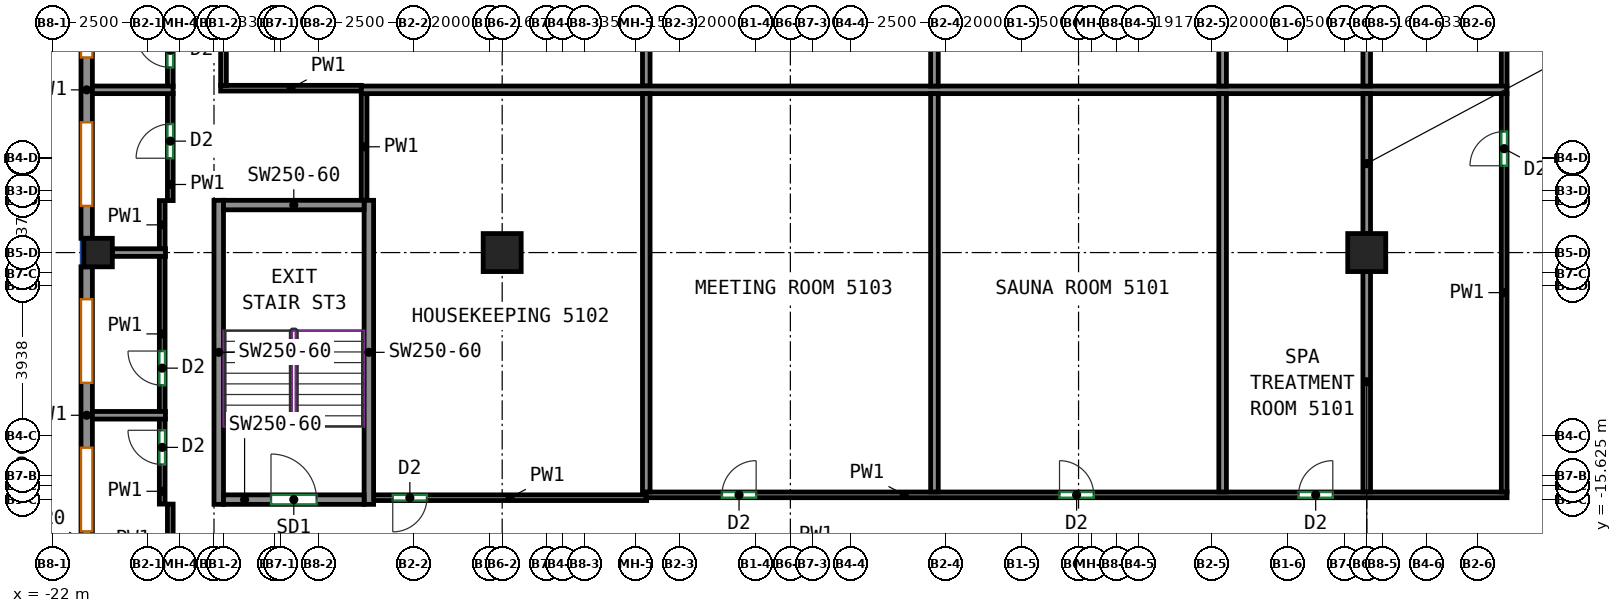
"""IFC4 building model, lengths in metres.
Left out: names, types, materials, properties, quantities, classifications, styles, units other than length and angle.
Written with IfcOpenShell. Run it as: python <this file> out.ifc"""

import sys

from ifc_helpers import new_model, si_unit, direction, frame, frame_2d, origin, origin_2d, place, context, subcontext, project, spatial, rectangle, extrude, source, transform, mapped, element, fill, save


model = new_model("IFC4")
c1 = context("Model", 3, precision=1e-05, world=origin(), true_north=direction((0.0, 1.0)))
c2 = subcontext(c1, "Body", "Model", "MODEL_VIEW")
j1 = project(units=[si_unit("LENGTHUNIT", "METRE"), si_unit("PLANEANGLEUNIT", "RADIAN")], contexts=[c1])
p1 = place(None, origin())
s1 = spatial("IfcSite", under=j1, at=p1, CompositionType="ELEMENT")
p2 = place(p1, origin())
s2 = spatial("IfcBuilding", under=s1, at=p2, CompositionType="ELEMENT")
p3 = place(p2, frame((0.0, 0.0, 210.1)))
s3 = spatial("IfcBuildingStorey", under=s2, at=p3, CompositionType="ELEMENT", Elevation=210.1)
m1 = source(origin(), c2, "Body", "SweptSolid", [
    extrude(rectangle(XDim=0.75, YDim=0.75, at=origin_2d()), origin(), (0.0, 0.0, 1.0), 3.12),
])
p4 = place(p3, frame((-20.8, -9.125, 0.0), z_axis=(0.0, 0.0, 1.0), x_axis=(1.0, 0.0, 0.0)))
e1 = element("IfcColumn", 1, at=p4, inside=s3, PredefinedType="COLUMN", context=c2, shape_type="MappedRepresentation", body=[
    mapped(m1, transform((0.0, 0.0, 0.0))),
])
m2 = source(origin(), c2, "Body", "SweptSolid", [
    extrude(rectangle(XDim=1.0, YDim=1.0, at=origin_2d()), origin(), (0.0, 0.0, 1.0), 3.12),
])
for number, where, z_axis, x_axis in (
    (2, (-10.167, -9.125, 0.0), (0.0, 0.0, 1.0), (1.0, 0.0, 0.0)),
    (3, (12.583, -9.125, 0.0), (0.0, 0.0, 1.0), (1.0, 0.0, 0.0)),
):
    element("IfcColumn", number, at=place(p3, frame(where, z_axis=z_axis, x_axis=x_axis)), inside=s3, PredefinedType="COLUMN", context=c2, shape_type="MappedRepresentation", body=[
        mapped(m2, transform((0.0, 0.0, 0.0))),
    ])
m3 = source(origin(), c2, "Body", "SweptSolid", [
    extrude(rectangle(XDim=8.0, YDim=0.25, at=frame_2d((4.0, 0.0))), origin(), (0.0, 0.0, 1.0), 3.12),
])
for number, where, z_axis, x_axis in (
    (4, (-17.625, -15.75, 0.0), (0.0, 0.0, 1.0), (0.0, 1.0, 0.0)),
    (5, (-13.675, -15.75, 0.0), (0.0, 0.0, 1.0), (0.0, 1.0, 0.0)),
):
    element("IfcWall", number, at=place(p3, frame(where, z_axis=z_axis, x_axis=x_axis)), inside=s3, PredefinedType="SHEAR", context=c2, shape_type="MappedRepresentation", body=[
        mapped(m3, transform((0.0, 0.0, 0.0))),
    ])
m4 = source(origin(), c2, "Body", "SweptSolid", [
    extrude(rectangle(XDim=3.7, YDim=0.25, at=frame_2d((1.85, 0.0))), origin(), (0.0, 0.0, 1.0), 3.12),
])
p5 = place(p3, frame((-17.5, -15.625, 0.0), z_axis=(0.0, 0.0, 1.0), x_axis=(1.0, 0.0, 0.0)))
e6 = element("IfcWall", 6, at=p5, inside=s3, PredefinedType="SHEAR", context=c2, shape_type="MappedRepresentation", body=[
    mapped(m4, transform((0.0, 0.0, 0.0))),
])
p6 = place(p5, frame((1.25, 0.0, 0.0)))
e7 = element("IfcOpeningElement", 7, at=p6, cuts=e6, PredefinedType="OPENING", context=c2, shape_type="SweptSolid", body=[
    extrude(rectangle(XDim=1.2, YDim=2.1, at=frame_2d((0.6, 1.05))), frame((0.0, 0.135, 0.0), z_axis=(0.0, -1.0, 0.0), x_axis=(1.0, 0.0, 0.0)), (0.0, 0.0, 1.0), 0.27),
])
p7 = place(p3, frame((-17.5, -7.875, 0.0), z_axis=(0.0, 0.0, 1.0), x_axis=(1.0, 0.0, 0.0)))
e8 = element("IfcWall", 8, at=p7, inside=s3, PredefinedType="SHEAR", context=c2, shape_type="MappedRepresentation", body=[
    mapped(m4, transform((0.0, 0.0, 0.0))),
])
m5 = source(origin(), c2, "Body", "SweptSolid", [
    extrude(rectangle(XDim=7.812, YDim=0.3, at=frame_2d((3.906, 0.0))), origin(), (0.0, 0.0, 1.0), 3.12),
])
p8 = place(p3, frame((-21.1, -0.938, 0.0), z_axis=(0.0, 0.0, 1.0), x_axis=(0.0, -1.0, 0.0)))
e9 = element("IfcWall", 9, at=p8, inside=s3, PredefinedType="SOLIDWALL", context=c2, shape_type="MappedRepresentation", body=[
    mapped(m5, transform((0.0, 0.0, 0.0))),
])
p9 = place(p8, frame((0.853, 0.0, 0.85)))
e10 = element("IfcOpeningElement", 10, at=p9, cuts=e9, PredefinedType="OPENING", context=c2, shape_type="SweptSolid", body=[
    extrude(rectangle(XDim=2.2, YDim=1.95, at=frame_2d((1.1, 0.975))), frame((0.0, 0.16, 0.0), z_axis=(0.0, -1.0, 0.0), x_axis=(1.0, 0.0, 0.0)), (0.0, 0.0, 1.0), 0.32),
])
p10 = place(p8, frame((4.76, 0.0, 0.85)))
e11 = element("IfcOpeningElement", 11, at=p10, cuts=e9, PredefinedType="OPENING", context=c2, shape_type="SweptSolid", body=[
    extrude(rectangle(XDim=2.2, YDim=1.95, at=frame_2d((1.1, 0.975))), frame((0.0, 0.16, 0.0), z_axis=(0.0, -1.0, 0.0), x_axis=(1.0, 0.0, 0.0)), (0.0, 0.0, 1.0), 0.32),
])
p11 = place(p3, frame((-21.1, -9.5, 0.0), z_axis=(0.0, 0.0, 1.0), x_axis=(0.0, -1.0, 0.0)))
e12 = element("IfcWall", 12, at=p11, inside=s3, PredefinedType="SOLIDWALL", context=c2, shape_type="MappedRepresentation", body=[
    mapped(m5, transform((0.0, 0.0, 0.0))),
])
p12 = place(p11, frame((0.853, 0.0, 0.85)))
e13 = element("IfcOpeningElement", 13, at=p12, cuts=e12, PredefinedType="OPENING", context=c2, shape_type="SweptSolid", body=[
    extrude(rectangle(XDim=2.2, YDim=1.95, at=frame_2d((1.1, 0.975))), frame((0.0, 0.16, 0.0), z_axis=(0.0, -1.0, 0.0), x_axis=(1.0, 0.0, 0.0)), (0.0, 0.0, 1.0), 0.32),
])
p13 = place(p11, frame((4.759, 0.0, 0.85)))
e14 = element("IfcOpeningElement", 14, at=p13, cuts=e12, PredefinedType="OPENING", context=c2, shape_type="SweptSolid", body=[
    extrude(rectangle(XDim=2.2, YDim=1.95, at=frame_2d((1.1, 0.975))), frame((0.0, 0.16, 0.0), z_axis=(0.0, -1.0, 0.0), x_axis=(1.0, 0.0, 0.0)), (0.0, 0.0, 1.0), 0.32),
])
p14 = place(p3, frame((-18.9, -17.598, 0.0), z_axis=(0.0, 0.0, 1.0), x_axis=(0.0, 1.0, 0.0)))
e15 = element("IfcWall", 15, at=p14, inside=s3, PredefinedType="PARTITIONING", context=c2, shape_type="SweptSolid", body=[
    extrude(rectangle(XDim=1.855, YDim=0.15, at=frame_2d((0.927, 0.0))), origin(), (0.0, 0.0, 1.0), 3.12),
])
p15 = place(p3, frame((-19.113, -15.743, 0.0), z_axis=(0.0, 0.0, 1.0), x_axis=(0.0, 1.0, 0.0)))
e16 = element("IfcWall", 16, at=p15, inside=s3, PredefinedType="PARTITIONING", context=c2, shape_type="SweptSolid", body=[
    extrude(rectangle(XDim=2.247, YDim=0.15, at=frame_2d((1.124, 0.0))), origin(), (0.0, 0.0, 1.0), 3.12),
])
p16 = place(p15, frame((1.042, 0.0, 0.0)))
e17 = element("IfcOpeningElement", 17, at=p16, cuts=e16, PredefinedType="OPENING", context=c2, shape_type="SweptSolid", body=[
    extrude(rectangle(XDim=0.9, YDim=2.1, at=frame_2d((0.45, 1.05))), frame((0.0, 0.085, 0.0), z_axis=(0.0, -1.0, 0.0), x_axis=(1.0, 0.0, 0.0)), (0.0, 0.0, 1.0), 0.17),
])
p17 = place(p3, frame((-19.113, -13.316, 0.0), z_axis=(0.0, 0.0, 1.0), x_axis=(0.0, 1.0, 0.0)))
e18 = element("IfcWall", 18, at=p17, inside=s3, PredefinedType="PARTITIONING", context=c2, shape_type="SweptSolid", body=[
    extrude(rectangle(XDim=4.101, YDim=0.15, at=frame_2d((2.05, 0.0))), origin(), (0.0, 0.0, 1.0), 3.12),
])
p18 = place(p17, frame((0.7, 0.0, 0.0)))
e19 = element("IfcOpeningElement", 19, at=p18, cuts=e18, PredefinedType="OPENING", context=c2, shape_type="SweptSolid", body=[
    extrude(rectangle(XDim=0.9, YDim=2.1, at=frame_2d((0.45, 1.05))), frame((0.0, 0.085, 0.0), z_axis=(0.0, -1.0, 0.0), x_axis=(1.0, 0.0, 0.0)), (0.0, 0.0, 1.0), 0.17),
])
p19 = place(p3, frame((-18.9, -7.757, 0.0), z_axis=(0.0, 0.0, 1.0), x_axis=(0.0, 1.0, 0.0)))
e20 = element("IfcWall", 20, at=p19, inside=s3, PredefinedType="PARTITIONING", context=c2, shape_type="SweptSolid", body=[
    extrude(rectangle(XDim=2.824, YDim=0.15, at=frame_2d((1.412, 0.0))), origin(), (0.0, 0.0, 1.0), 3.12),
])
p20 = place(p19, frame((1.114, 0.0, 0.0)))
e21 = element("IfcOpeningElement", 21, at=p20, cuts=e20, PredefinedType="OPENING", context=c2, shape_type="SweptSolid", body=[
    extrude(rectangle(XDim=0.9, YDim=2.1, at=frame_2d((0.45, 1.05))), frame((0.0, 0.085, 0.0), z_axis=(0.0, -1.0, 0.0), x_axis=(1.0, 0.0, 0.0)), (0.0, 0.0, 1.0), 0.17),
])
p21 = place(p3, frame((-19.113, -9.035, 0.0), z_axis=(0.0, 0.0, 1.0), x_axis=(0.0, 1.0, 0.0)))
e22 = element("IfcWall", 22, at=p21, inside=s3, PredefinedType="PARTITIONING", context=c2, shape_type="SweptSolid", body=[
    extrude(rectangle(XDim=1.278, YDim=0.15, at=frame_2d((0.639, 0.0))), origin(), (0.0, 0.0, 1.0), 3.12),
])
p22 = place(p3, frame((-18.9, -4.753, 0.0), z_axis=(0.0, 0.0, 1.0), x_axis=(0.0, 1.0, 0.0)))
e23 = element("IfcWall", 23, at=p22, inside=s3, PredefinedType="PARTITIONING", context=c2, shape_type="SweptSolid", body=[
    extrude(rectangle(XDim=4.101, YDim=0.15, at=frame_2d((2.05, 0.0))), origin(), (0.0, 0.0, 1.0), 3.12),
])
p23 = place(p22, frame((0.5, 0.0, 0.0)))
e24 = element("IfcOpeningElement", 24, at=p23, cuts=e23, PredefinedType="OPENING", context=c2, shape_type="SweptSolid", body=[
    extrude(rectangle(XDim=0.9, YDim=2.1, at=frame_2d((0.45, 1.05))), frame((0.0, 0.085, 0.0), z_axis=(0.0, -1.0, 0.0), x_axis=(1.0, 0.0, 0.0)), (0.0, 0.0, 1.0), 0.17),
])
p24 = place(p3, frame((-17.575, -4.8, 0.0), z_axis=(0.0, 0.0, 1.0), x_axis=(1.0, 0.0, 0.0)))
e25 = element("IfcWall", 25, at=p24, inside=s3, PredefinedType="PARTITIONING", context=c2, shape_type="SweptSolid", body=[
    extrude(rectangle(XDim=3.702, YDim=0.15, at=frame_2d((1.851, 0.0))), origin(), (0.0, 0.0, 1.0), 3.12),
])
p25 = place(p3, frame((-17.5, -4.725, 0.0), z_axis=(0.0, 0.0, 1.0), x_axis=(0.0, 1.0, 0.0)))
e26 = element("IfcWall", 26, at=p25, inside=s3, PredefinedType="PARTITIONING", context=c2, shape_type="SweptSolid", body=[
    extrude(rectangle(XDim=8.35, YDim=0.15, at=frame_2d((4.175, 0.0))), origin(), (0.0, 0.0, 1.0), 3.12),
])
p26 = place(p3, frame((16.2, -4.753, 0.0), z_axis=(0.0, 0.0, 1.0), x_axis=(0.0, 1.0, 0.0)))
e27 = element("IfcWall", 27, at=p26, inside=s3, PredefinedType="PARTITIONING", context=c2, shape_type="SweptSolid", body=[
    extrude(rectangle(XDim=8.378, YDim=0.15, at=frame_2d((4.189, 0.0))), origin(), (0.0, 0.0, 1.0), 3.12),
])
p27 = place(p26, frame((1.514, 0.0, 0.0)))
e28 = element("IfcOpeningElement", 28, at=p27, cuts=e27, PredefinedType="OPENING", context=c2, shape_type="SweptSolid", body=[
    extrude(rectangle(XDim=0.9, YDim=2.1, at=frame_2d((0.45, 1.05))), frame((0.0, 0.085, 0.0), z_axis=(0.0, -1.0, 0.0), x_axis=(1.0, 0.0, 0.0)), (0.0, 0.0, 1.0), 0.17),
])
p28 = place(p3, frame((-13.8, -7.75, 0.0), z_axis=(0.0, 0.0, 1.0), x_axis=(0.0, 1.0, 0.0)))
e29 = element("IfcWall", 29, at=p28, inside=s3, PredefinedType="PARTITIONING", context=c2, shape_type="SweptSolid", body=[
    extrude(rectangle(XDim=2.817, YDim=0.15, at=frame_2d((1.408, 0.0))), origin(), (0.0, 0.0, 1.0), 3.12),
])
p29 = place(p3, frame((-6.365, -15.575, 0.0), z_axis=(0.0, 0.0, 1.0), x_axis=(-1.0, 0.0, 0.0)))
e30 = element("IfcWall", 30, at=p29, inside=s3, PredefinedType="PARTITIONING", context=c2, shape_type="SweptSolid", body=[
    extrude(rectangle(XDim=7.185, YDim=0.15, at=frame_2d((3.593, 0.0))), origin(), (0.0, 0.0, 1.0), 3.12),
])
p30 = place(p29, frame((5.781, 0.0, 0.0)))
e31 = element("IfcOpeningElement", 31, at=p30, cuts=e30, PredefinedType="OPENING", context=c2, shape_type="SweptSolid", body=[
    extrude(rectangle(XDim=0.9, YDim=2.1, at=frame_2d((0.45, 1.05))), frame((0.0, 0.085, 0.0), z_axis=(0.0, -1.0, 0.0), x_axis=(1.0, 0.0, 0.0)), (0.0, 0.0, 1.0), 0.17),
])
p31 = place(p3, frame((-6.385, -15.5, 0.0), z_axis=(0.0, 0.0, 1.0), x_axis=(1.0, 0.0, 0.0)))
e32 = element("IfcWall", 32, at=p31, inside=s3, PredefinedType="PARTITIONING", context=c2, shape_type="SweptSolid", body=[
    extrude(rectangle(XDim=22.66, YDim=0.15, at=frame_2d((11.33, 0.0))), origin(), (0.0, 0.0, 1.0), 3.12),
])
p32 = place(p31, frame((2.001, 0.0, 0.0)))
e33 = element("IfcOpeningElement", 33, at=p32, cuts=e32, PredefinedType="OPENING", context=c2, shape_type="SweptSolid", body=[
    extrude(rectangle(XDim=0.9, YDim=2.1, at=frame_2d((0.45, 1.05))), frame((0.0, 0.085, 0.0), z_axis=(0.0, -1.0, 0.0), x_axis=(1.0, 0.0, 0.0)), (0.0, 0.0, 1.0), 0.17),
])
p33 = place(p31, frame((10.884, 0.0, 0.0)))
e34 = element("IfcOpeningElement", 34, at=p33, cuts=e32, PredefinedType="OPENING", context=c2, shape_type="SweptSolid", body=[
    extrude(rectangle(XDim=0.9, YDim=2.1, at=frame_2d((0.45, 1.05))), frame((0.0, 0.085, 0.0), z_axis=(0.0, -1.0, 0.0), x_axis=(1.0, 0.0, 0.0)), (0.0, 0.0, 1.0), 0.17),
])
p34 = place(p31, frame((17.175, 0.0, 0.0)))
e35 = element("IfcOpeningElement", 35, at=p34, cuts=e32, PredefinedType="OPENING", context=c2, shape_type="SweptSolid", body=[
    extrude(rectangle(XDim=0.9, YDim=2.1, at=frame_2d((0.45, 1.05))), frame((0.0, 0.085, 0.0), z_axis=(0.0, -1.0, 0.0), x_axis=(1.0, 0.0, 0.0)), (0.0, 0.0, 1.0), 0.17),
])
p35 = place(p3, frame((16.2, -15.425, 0.0), z_axis=(0.0, 0.0, 1.0), x_axis=(0.0, 1.0, 0.0)))
e36 = element("IfcWall", 36, at=p35, inside=s3, PredefinedType="PARTITIONING", context=c2, shape_type="SweptSolid", body=[
    extrude(rectangle(XDim=10.492, YDim=0.15, at=frame_2d((5.246, 0.0))), origin(), (0.0, 0.0, 1.0), 3.12),
])
p36 = place(p35, frame((8.584, 0.0, 0.0)))
e37 = element("IfcOpeningElement", 37, at=p36, cuts=e36, PredefinedType="OPENING", context=c2, shape_type="SweptSolid", body=[
    extrude(rectangle(XDim=0.9, YDim=2.1, at=frame_2d((0.45, 1.05))), frame((0.0, 0.085, 0.0), z_axis=(0.0, -1.0, 0.0), x_axis=(1.0, 0.0, 0.0)), (0.0, 0.0, 1.0), 0.17),
])
p37 = place(p3, frame((-19.027, -13.406, 0.0), z_axis=(0.0, 0.0, 1.0), x_axis=(-1.0, 0.0, 0.0)))
e38 = element("IfcWall", 38, at=p37, inside=s3, PredefinedType="PARTITIONING", context=c2, shape_type="SweptSolid", body=[
    extrude(rectangle(XDim=1.973, YDim=0.2, at=frame_2d((0.986, 0.0))), origin(), (0.0, 0.0, 1.0), 3.12),
])
p38 = place(p3, frame((-20.425, -9.125, 0.0), z_axis=(0.0, 0.0, 1.0), x_axis=(1.0, 0.0, 0.0)))
e39 = element("IfcWall", 39, at=p38, inside=s3, PredefinedType="PARTITIONING", context=c2, shape_type="SweptSolid", body=[
    extrude(rectangle(XDim=1.398, YDim=0.2, at=frame_2d((0.699, 0.0))), origin(), (0.0, 0.0, 1.0), 3.12),
])
p39 = place(p3, frame((-21.0, -4.843, 0.0), z_axis=(0.0, 0.0, 1.0), x_axis=(1.0, 0.0, 0.0)))
e40 = element("IfcWall", 40, at=p39, inside=s3, PredefinedType="PARTITIONING", context=c2, shape_type="SweptSolid", body=[
    extrude(rectangle(XDim=2.173, YDim=0.2, at=frame_2d((1.086, 0.0))), origin(), (0.0, 0.0, 1.0), 3.12),
])
p40 = place(p3, frame((-6.375, -4.743, 0.0), z_axis=(0.0, 0.0, 1.0), x_axis=(0.0, 1.0, 0.0)))
e41 = element("IfcWall", 41, at=p40, inside=s3, PredefinedType="PARTITIONING", context=c2, shape_type="SweptSolid", body=[
    extrude(rectangle(XDim=8.366, YDim=0.2, at=frame_2d((4.183, 0.0))), origin(), (0.0, 0.0, 1.0), 3.12),
])
p41 = place(p3, frame((-13.873, -4.843, 0.0), z_axis=(0.0, 0.0, 1.0), x_axis=(1.0, 0.0, 0.0)))
e42 = element("IfcWall", 42, at=p41, inside=s3, PredefinedType="PARTITIONING", context=c2, shape_type="SweptSolid", body=[
    extrude(rectangle(XDim=30.146, YDim=0.2, at=frame_2d((15.073, 0.0))), origin(), (0.0, 0.0, 1.0), 3.12),
])
for number, where, z_axis, x_axis in (
    (43, (1.208, -4.743, 0.0), (0.0, 0.0, 1.0), (0.0, 1.0, 0.0)),
    (44, (8.791, -4.743, 0.0), (0.0, 0.0, 1.0), (0.0, 1.0, 0.0)),
):
    element("IfcWall", number, at=place(p3, frame(where, z_axis=z_axis, x_axis=x_axis)), inside=s3, PredefinedType="PARTITIONING", context=c2, shape_type="SweptSolid", body=[
        extrude(rectangle(XDim=8.366, YDim=0.2, at=frame_2d((4.183, 0.0))), origin(), (0.0, 0.0, 1.0), 3.12),
    ])
p42 = place(p3, frame((12.583, -4.743, 0.0), z_axis=(0.0, 0.0, 1.0), x_axis=(0.0, 1.0, 0.0)))
e45 = element("IfcWall", 45, at=p42, inside=s3, PredefinedType="PARTITIONING", context=c2, shape_type="SweptSolid", body=[
    extrude(rectangle(XDim=3.681, YDim=0.2, at=frame_2d((1.84, 0.0))), origin(), (0.0, 0.0, 1.0), 2.52),
])
for number, where, z_axis, x_axis in (
    (46, (-6.375, -15.423, 0.0), (0.0, 0.0, 1.0), (0.0, 1.0, 0.0)),
    (47, (1.208, -15.423, 0.0), (0.0, 0.0, 1.0), (0.0, 1.0, 0.0)),
    (48, (8.791, -15.423, 0.0), (0.0, 0.0, 1.0), (0.0, 1.0, 0.0)),
):
    element("IfcWall", number, at=place(p3, frame(where, z_axis=z_axis, x_axis=x_axis)), inside=s3, PredefinedType="PARTITIONING", context=c2, shape_type="SweptSolid", body=[
        extrude(rectangle(XDim=10.48, YDim=0.2, at=frame_2d((5.24, 0.0))), origin(), (0.0, 0.0, 1.0), 3.12),
    ])
p43 = place(p3, frame((12.583, -8.625, 0.0), z_axis=(0.0, 0.0, 1.0), x_axis=(0.0, 1.0, 0.0)))
e49 = element("IfcWall", 49, at=p43, inside=s3, PredefinedType="PARTITIONING", context=c2, shape_type="SweptSolid", body=[
    extrude(rectangle(XDim=3.682, YDim=0.2, at=frame_2d((1.841, 0.0))), origin(), (0.0, 0.0, 1.0), 2.52),
])
p44 = place(p3, frame((12.583, -15.423, 0.0), z_axis=(0.0, 0.0, 1.0), x_axis=(0.0, 1.0, 0.0)))
e50 = element("IfcWall", 50, at=p44, inside=s3, PredefinedType="PARTITIONING", context=c2, shape_type="SweptSolid", body=[
    extrude(rectangle(XDim=5.798, YDim=0.2, at=frame_2d((2.899, 0.0))), origin(), (0.0, 0.0, 1.0), 2.52),
])
p45 = place(p9, origin())
e51 = element("IfcWindow", 51, at=p45, inside=s3, PartitioningType="SINGLE_PANEL", PredefinedType="WINDOW", context=c2, shape_type="SweptSolid", body=[
    extrude(rectangle(XDim=2.2, YDim=1.95, at=frame_2d((1.1, 0.975))), frame((0.0, 0.03, 0.0), z_axis=(0.0, -1.0, 0.0), x_axis=(1.0, 0.0, 0.0)), (0.0, 0.0, 1.0), 0.06),
])
fill(e10, e51)
p46 = place(p10, origin())
e52 = element("IfcWindow", 52, at=p46, inside=s3, PartitioningType="SINGLE_PANEL", PredefinedType="WINDOW", context=c2, shape_type="SweptSolid", body=[
    extrude(rectangle(XDim=2.2, YDim=1.95, at=frame_2d((1.1, 0.975))), frame((0.0, 0.03, 0.0), z_axis=(0.0, -1.0, 0.0), x_axis=(1.0, 0.0, 0.0)), (0.0, 0.0, 1.0), 0.06),
])
fill(e11, e52)
p47 = place(p12, origin())
e53 = element("IfcWindow", 53, at=p47, inside=s3, PartitioningType="SINGLE_PANEL", PredefinedType="WINDOW", context=c2, shape_type="SweptSolid", body=[
    extrude(rectangle(XDim=2.2, YDim=1.95, at=frame_2d((1.1, 0.975))), frame((0.0, 0.03, 0.0), z_axis=(0.0, -1.0, 0.0), x_axis=(1.0, 0.0, 0.0)), (0.0, 0.0, 1.0), 0.06),
])
fill(e13, e53)
p48 = place(p13, origin())
e54 = element("IfcWindow", 54, at=p48, inside=s3, PartitioningType="SINGLE_PANEL", PredefinedType="WINDOW", context=c2, shape_type="SweptSolid", body=[
    extrude(rectangle(XDim=2.2, YDim=1.95, at=frame_2d((1.1, 0.975))), frame((0.0, 0.03, 0.0), z_axis=(0.0, -1.0, 0.0), x_axis=(1.0, 0.0, 0.0)), (0.0, 0.0, 1.0), 0.06),
])
fill(e14, e54)
p49 = place(p6, origin())
e55 = element("IfcDoor", 55, at=p49, inside=s3, OperationType="DOUBLE_DOOR_SINGLE_SWING", PredefinedType="DOOR", context=c2, shape_type="SweptSolid", body=[
    extrude(rectangle(XDim=1.2, YDim=2.1, at=frame_2d((0.6, 1.05))), frame((0.0, 0.025, 0.0), z_axis=(0.0, -1.0, 0.0), x_axis=(1.0, 0.0, 0.0)), (0.0, 0.0, 1.0), 0.05),
])
fill(e7, e55)
p50 = place(p30, origin())
e56 = element("IfcDoor", 56, at=p50, inside=s3, OperationType="SINGLE_SWING_RIGHT", PredefinedType="DOOR", context=c2, shape_type="SweptSolid", body=[
    extrude(rectangle(XDim=0.9, YDim=2.1, at=frame_2d((0.45, 1.05))), frame((0.0, 0.025, 0.0), z_axis=(0.0, -1.0, 0.0), x_axis=(1.0, 0.0, 0.0)), (0.0, 0.0, 1.0), 0.05),
])
fill(e31, e56)
p51 = place(p32, origin())
e57 = element("IfcDoor", 57, at=p51, inside=s3, OperationType="SINGLE_SWING_RIGHT", PredefinedType="DOOR", context=c2, shape_type="SweptSolid", body=[
    extrude(rectangle(XDim=0.9, YDim=2.1, at=frame_2d((0.45, 1.05))), frame((0.0, 0.025, 0.0), z_axis=(0.0, -1.0, 0.0), x_axis=(1.0, 0.0, 0.0)), (0.0, 0.0, 1.0), 0.05),
])
fill(e33, e57)
p52 = place(p33, origin())
e58 = element("IfcDoor", 58, at=p52, inside=s3, OperationType="SINGLE_SWING_LEFT", PredefinedType="DOOR", context=c2, shape_type="SweptSolid", body=[
    extrude(rectangle(XDim=0.9, YDim=2.1, at=frame_2d((0.45, 1.05))), frame((0.0, 0.025, 0.0), z_axis=(0.0, -1.0, 0.0), x_axis=(1.0, 0.0, 0.0)), (0.0, 0.0, 1.0), 0.05),
])
fill(e34, e58)
p53 = place(p34, origin())
e59 = element("IfcDoor", 59, at=p53, inside=s3, OperationType="SINGLE_SWING_RIGHT", PredefinedType="DOOR", context=c2, shape_type="SweptSolid", body=[
    extrude(rectangle(XDim=0.9, YDim=2.1, at=frame_2d((0.45, 1.05))), frame((0.0, 0.025, 0.0), z_axis=(0.0, -1.0, 0.0), x_axis=(1.0, 0.0, 0.0)), (0.0, 0.0, 1.0), 0.05),
])
fill(e35, e59)
p54 = place(p16, origin())
e60 = element("IfcDoor", 60, at=p54, inside=s3, OperationType="SINGLE_SWING_RIGHT", PredefinedType="DOOR", context=c2, shape_type="SweptSolid", body=[
    extrude(rectangle(XDim=0.9, YDim=2.1, at=frame_2d((0.45, 1.05))), frame((0.0, 0.025, 0.0), z_axis=(0.0, -1.0, 0.0), x_axis=(1.0, 0.0, 0.0)), (0.0, 0.0, 1.0), 0.05),
])
fill(e17, e60)
p55 = place(p18, origin())
e61 = element("IfcDoor", 61, at=p55, inside=s3, OperationType="SINGLE_SWING_RIGHT", PredefinedType="DOOR", context=c2, shape_type="SweptSolid", body=[
    extrude(rectangle(XDim=0.9, YDim=2.1, at=frame_2d((0.45, 1.05))), frame((0.0, 0.025, 0.0), z_axis=(0.0, -1.0, 0.0), x_axis=(1.0, 0.0, 0.0)), (0.0, 0.0, 1.0), 0.05),
])
fill(e19, e61)
p56 = place(p36, origin())
e62 = element("IfcDoor", 62, at=p56, inside=s3, OperationType="SINGLE_SWING_LEFT", PredefinedType="DOOR", context=c2, shape_type="SweptSolid", body=[
    extrude(rectangle(XDim=0.9, YDim=2.1, at=frame_2d((0.45, 1.05))), frame((0.0, 0.025, 0.0), z_axis=(0.0, -1.0, 0.0), x_axis=(1.0, 0.0, 0.0)), (0.0, 0.0, 1.0), 0.05),
])
fill(e37, e62)
p57 = place(p20, origin())
e63 = element("IfcDoor", 63, at=p57, inside=s3, OperationType="SINGLE_SWING_LEFT", PredefinedType="DOOR", context=c2, shape_type="SweptSolid", body=[
    extrude(rectangle(XDim=0.9, YDim=2.1, at=frame_2d((0.45, 1.05))), frame((0.0, 0.025, 0.0), z_axis=(0.0, -1.0, 0.0), x_axis=(1.0, 0.0, 0.0)), (0.0, 0.0, 1.0), 0.05),
])
fill(e21, e63)
p58 = place(p23, origin())
e64 = element("IfcDoor", 64, at=p58, inside=s3, OperationType="SINGLE_SWING_RIGHT", PredefinedType="DOOR", context=c2, shape_type="SweptSolid", body=[
    extrude(rectangle(XDim=0.9, YDim=2.1, at=frame_2d((0.45, 1.05))), frame((0.0, 0.025, 0.0), z_axis=(0.0, -1.0, 0.0), x_axis=(1.0, 0.0, 0.0)), (0.0, 0.0, 1.0), 0.05),
])
fill(e24, e64)
save(model, sys.argv[1])
